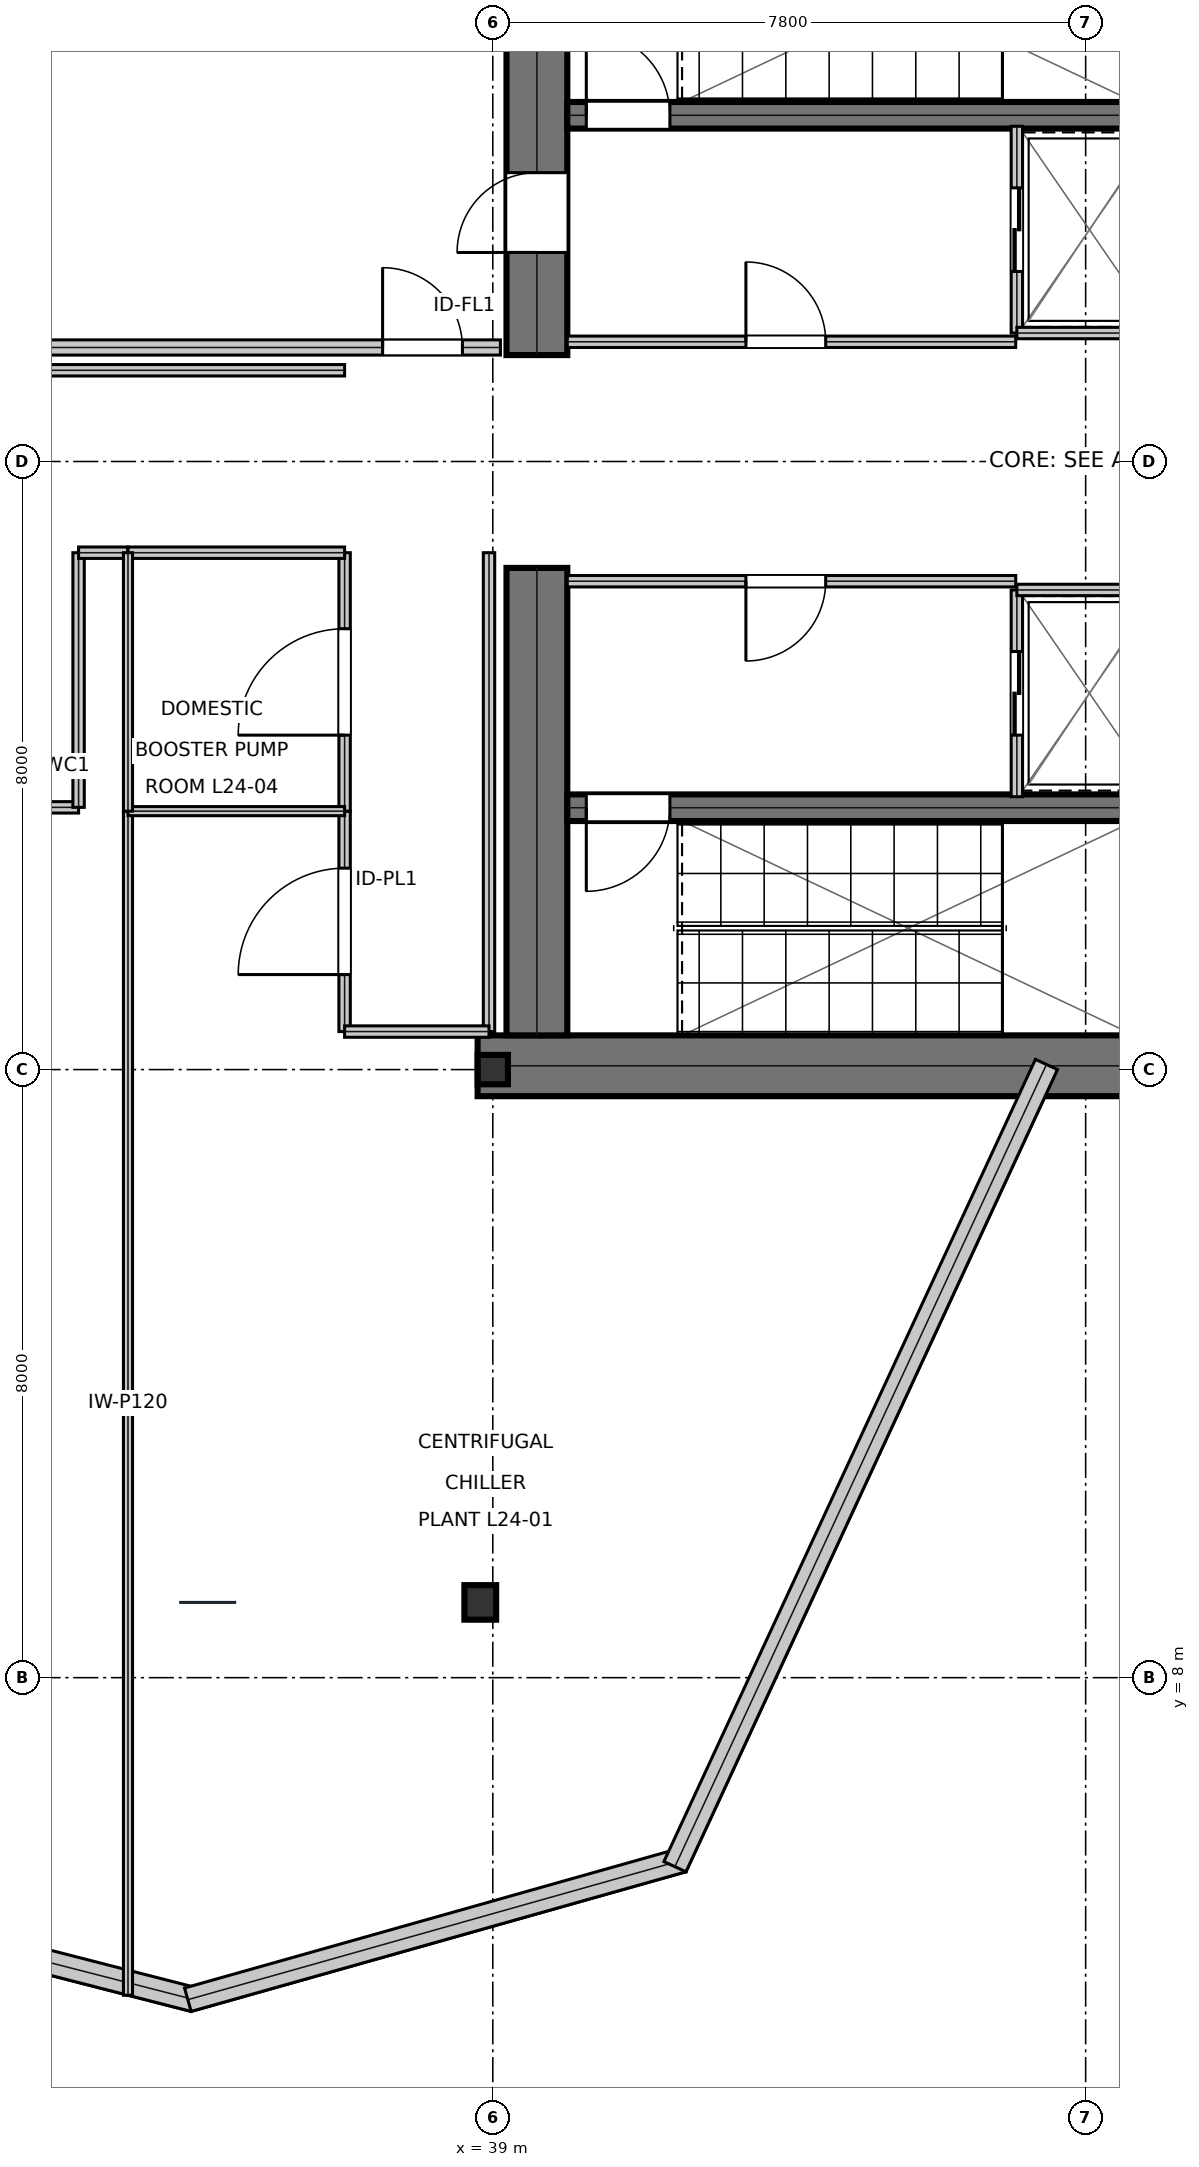
"""IFC4 building model, lengths in metres.
Left out: names, types, materials, properties, quantities, classifications, styles, units other than length and angle.
Written with IfcOpenShell. Run it as: python <this file> out.ifc"""

import sys

from ifc_helpers import new_model, si_unit, direction, frame, frame_2d, origin, origin_2d, place, context, subcontext, project, spatial, rectangle, i_section, extrude, element, fill, save


model = new_model("IFC4")
c1 = context("Model", 3, precision=1e-05, world=origin(), true_north=direction((0.0, 1.0)))
c2 = subcontext(c1, "Body", "Model", "MODEL_VIEW")
j1 = project(units=[si_unit("LENGTHUNIT", "METRE"), si_unit("PLANEANGLEUNIT", "RADIAN")], contexts=[c1])
p1 = place(None, origin())
s1 = spatial("IfcSite", under=j1, at=p1, CompositionType="ELEMENT")
p2 = place(p1, origin())
s2 = spatial("IfcBuilding", under=s1, at=p2, CompositionType="ELEMENT")
p3 = place(p2, frame((0.0, 0.0, 106.65)))
s3 = spatial("IfcBuildingStorey", under=s2, at=p3, CompositionType="ELEMENT", Elevation=106.65)
p4 = place(p3, frame((38.8, 16.05, 0.0), z_axis=(0.0, 0.0, 1.0), x_axis=(1.0, 0.0, 0.0)))
e1 = element("IfcWall", 1, at=p4, inside=s3, PredefinedType="SHEAR", context=c2, shape_type="SweptSolid", body=[
    extrude(rectangle(XDim=16.0, YDim=0.8, at=frame_2d((8.0, 0.0))), origin(), (0.0, 0.0, 1.0), 5.12),
])
p5 = place(p3, frame((39.58, 16.45, 0.0), z_axis=(0.0, 0.0, 1.0), x_axis=(0.0, 1.0, 0.0)))
e2 = element("IfcWall", 2, at=p5, inside=s3, PredefinedType="SHEAR", context=c2, shape_type="SweptSolid", body=[
    extrude(rectangle(XDim=6.15, YDim=0.8, at=frame_2d((3.075, 0.0))), origin(), (0.0, 0.0, 1.0), 5.12),
])
p6 = place(p3, frame((39.58, 25.4, 0.0), z_axis=(0.0, 0.0, 1.0), x_axis=(0.0, 1.0, 0.0)))
e3 = element("IfcWall", 3, at=p6, inside=s3, PredefinedType="SHEAR", context=c2, shape_type="SweptSolid", body=[
    extrude(rectangle(XDim=6.15, YDim=0.8, at=frame_2d((3.075, 0.0))), origin(), (0.0, 0.0, 1.0), 5.12),
])
p7 = place(p6, frame((1.35, 0.0, 0.0)))
e4 = element("IfcOpeningElement", 4, at=p7, cuts=e3, PredefinedType="OPENING", context=c2, shape_type="SweptSolid", body=[
    extrude(rectangle(XDim=1.05, YDim=2.15, at=frame_2d((0.525, 1.075))), frame((0.0, 0.41, 0.0), z_axis=(0.0, -1.0, 0.0), x_axis=(1.0, 0.0, 0.0)), (0.0, 0.0, 1.0), 0.82),
])
p8 = place(p3, frame((39.98, 28.555, 0.0), z_axis=(0.0, 0.0, 1.0), x_axis=(1.0, 0.0, 0.0)))
e5 = element("IfcWall", 5, at=p8, inside=s3, PredefinedType="SHEAR", context=c2, shape_type="SweptSolid", body=[
    extrude(rectangle(XDim=7.71, YDim=0.35, at=frame_2d((3.855, 0.0))), origin(), (0.0, 0.0, 1.0), 5.12),
])
p9 = place(p8, frame((0.25, 0.0, 0.0)))
e6 = element("IfcOpeningElement", 6, at=p9, cuts=e5, PredefinedType="OPENING", context=c2, shape_type="SweptSolid", body=[
    extrude(rectangle(XDim=1.1, YDim=2.15, at=frame_2d((0.55, 1.075))), frame((0.0, 0.185, 0.0), z_axis=(0.0, -1.0, 0.0), x_axis=(1.0, 0.0, 0.0)), (0.0, 0.0, 1.0), 0.37),
])
p10 = place(p3, frame((39.98, 19.445, 0.0), z_axis=(0.0, 0.0, 1.0), x_axis=(1.0, 0.0, 0.0)))
e7 = element("IfcWall", 7, at=p10, inside=s3, PredefinedType="SHEAR", context=c2, shape_type="SweptSolid", body=[
    extrude(rectangle(XDim=7.71, YDim=0.35, at=frame_2d((3.855, 0.0))), origin(), (0.0, 0.0, 1.0), 5.12),
])
p11 = place(p10, frame((0.25, 0.0, 0.0)))
e8 = element("IfcOpeningElement", 8, at=p11, cuts=e7, PredefinedType="OPENING", context=c2, shape_type="SweptSolid", body=[
    extrude(rectangle(XDim=1.1, YDim=2.15, at=frame_2d((0.55, 1.075))), frame((0.0, 0.185, 0.0), z_axis=(0.0, -1.0, 0.0), x_axis=(1.0, 0.0, 0.0)), (0.0, 0.0, 1.0), 0.37),
])
p12 = place(p3, frame((39.0, 16.0, 0.0), z_axis=(0.0, 0.0, 1.0), x_axis=(1.0, 0.0, 0.0)))
e9 = element("IfcColumn", 9, at=p12, inside=s3, PredefinedType="COLUMN", context=c2, shape_type="SweptSolid", body=[
    extrude(i_section(OverallWidth=0.398, OverallDepth=0.387, WebThickness=0.021, FlangeThickness=0.033, at=origin_2d()), origin(), (0.0, 0.0, 1.0), 5.394),
])
p13 = place(p3, frame((38.835, 8.99, 0.016), z_axis=(-0.002773965371, 0.016780216752, 0.99985535426), x_axis=(-0.986609855888, -0.163098106258, 0.0)))
e10 = element("IfcColumn", 10, at=p13, inside=s3, PredefinedType="COLUMN", context=c2, shape_type="SweptSolid", body=[
    extrude(i_section(OverallWidth=0.418, OverallDepth=0.455, WebThickness=0.042, FlangeThickness=0.068, at=origin_2d()), origin(), (0.0, 0.0, 1.0), 5.369),
])
p14 = place(p3, frame((28.561, 5.434, 0.0), z_axis=(0.0, 0.0, 1.0), x_axis=(0.968632710221, -0.248496826319, 0.0)))
e11 = element("IfcWall", 11, at=p14, inside=s3, PredefinedType="STANDARD", context=c2, shape_type="SweptSolid", body=[
    extrude(rectangle(XDim=6.721, YDim=0.32, at=frame_2d((3.361, 0.0))), origin(), (0.0, 0.0, 1.0), 5.12),
])
p15 = place(p3, frame((34.988, 3.763, 0.0), z_axis=(0.0, 0.0, 1.0), x_axis=(0.962413642038, 0.27158788931, 0.0)))
e12 = element("IfcWall", 12, at=p15, inside=s3, PredefinedType="STANDARD", context=c2, shape_type="SweptSolid", body=[
    extrude(rectangle(XDim=6.764, YDim=0.32, at=frame_2d((3.382, 0.0))), origin(), (0.0, 0.0, 1.0), 5.12),
])
p16 = place(p3, frame((41.396, 5.513, 0.0), z_axis=(0.0, 0.0, 1.0), x_axis=(0.420271770487, 0.907398280212, 0.0)))
e13 = element("IfcWall", 13, at=p16, inside=s3, PredefinedType="STANDARD", context=c2, shape_type="SweptSolid", body=[
    extrude(rectangle(XDim=11.631, YDim=0.32, at=frame_2d((5.815, 0.0))), origin(), (0.0, 0.0, 1.0), 4.648),
])
p17 = place(p3, frame((39.98, 25.575, 0.0), z_axis=(0.0, 0.0, 1.0), x_axis=(1.0, 0.0, 0.0)))
e14 = element("IfcWall", 14, at=p17, inside=s3, PredefinedType="PARTITIONING", context=c2, shape_type="SweptSolid", body=[
    extrude(rectangle(XDim=5.9, YDim=0.15, at=frame_2d((2.95, 0.0))), origin(), (0.0, 0.0, 1.0), 5.12),
])
p18 = place(p17, frame((2.35, 0.0, 0.0)))
e15 = element("IfcOpeningElement", 15, at=p18, cuts=e14, PredefinedType="OPENING", context=c2, shape_type="SweptSolid", body=[
    extrude(rectangle(XDim=1.05, YDim=2.15, at=frame_2d((0.525, 1.075))), frame((0.0, 0.085, 0.0), z_axis=(0.0, -1.0, 0.0), x_axis=(1.0, 0.0, 0.0)), (0.0, 0.0, 1.0), 0.17),
])
p19 = place(p3, frame((39.98, 22.425, 0.0), z_axis=(0.0, 0.0, 1.0), x_axis=(1.0, 0.0, 0.0)))
e16 = element("IfcWall", 16, at=p19, inside=s3, PredefinedType="PARTITIONING", context=c2, shape_type="SweptSolid", body=[
    extrude(rectangle(XDim=5.9, YDim=0.15, at=frame_2d((2.95, 0.0))), origin(), (0.0, 0.0, 1.0), 5.12),
])
p20 = place(p19, frame((2.35, 0.0, 0.0)))
e17 = element("IfcOpeningElement", 17, at=p20, cuts=e16, PredefinedType="OPENING", context=c2, shape_type="SweptSolid", body=[
    extrude(rectangle(XDim=1.05, YDim=2.15, at=frame_2d((0.525, 1.075))), frame((0.0, 0.085, 0.0), z_axis=(0.0, -1.0, 0.0), x_axis=(1.0, 0.0, 0.0)), (0.0, 0.0, 1.0), 0.17),
])
p21 = place(p3, frame((45.895, 25.69, 0.0), z_axis=(0.0, 0.0, 1.0), x_axis=(0.0, 1.0, 0.0)))
e18 = element("IfcWall", 18, at=p21, inside=s3, PredefinedType="PARTITIONING", context=c2, shape_type="SweptSolid", body=[
    extrude(rectangle(XDim=2.72, YDim=0.15, at=frame_2d((1.36, 0.0))), origin(), (0.0, 0.0, 1.0), 5.12),
])
p22 = place(p21, frame((0.81, 0.0, 0.0)))
e19 = element("IfcOpeningElement", 19, at=p22, cuts=e18, PredefinedType="OPENING", context=c2, shape_type="SweptSolid", body=[
    extrude(rectangle(XDim=1.1, YDim=2.15, at=frame_2d((0.55, 1.075))), frame((0.0, 0.085, 0.0), z_axis=(0.0, -1.0, 0.0), x_axis=(1.0, 0.0, 0.0)), (0.0, 0.0, 1.0), 0.17),
])
p23 = place(p3, frame((45.895, 25.69, 0.0), z_axis=(0.0, 0.0, 1.0), x_axis=(1.0, 0.0, 0.0)))
e20 = element("IfcWall", 20, at=p23, inside=s3, PredefinedType="PARTITIONING", context=c2, shape_type="SweptSolid", body=[
    extrude(rectangle(XDim=1.915, YDim=0.15, at=frame_2d((0.958, 0.0))), origin(), (0.0, 0.0, 1.0), 5.12),
])
p24 = place(p3, frame((45.895, 19.59, 0.0), z_axis=(0.0, 0.0, 1.0), x_axis=(0.0, 1.0, 0.0)))
e21 = element("IfcWall", 21, at=p24, inside=s3, PredefinedType="PARTITIONING", context=c2, shape_type="SweptSolid", body=[
    extrude(rectangle(XDim=2.72, YDim=0.15, at=frame_2d((1.36, 0.0))), origin(), (0.0, 0.0, 1.0), 5.12),
])
p25 = place(p24, frame((0.81, 0.0, 0.0)))
e22 = element("IfcOpeningElement", 22, at=p25, cuts=e21, PredefinedType="OPENING", context=c2, shape_type="SweptSolid", body=[
    extrude(rectangle(XDim=1.1, YDim=2.15, at=frame_2d((0.55, 1.075))), frame((0.0, 0.085, 0.0), z_axis=(0.0, -1.0, 0.0), x_axis=(1.0, 0.0, 0.0)), (0.0, 0.0, 1.0), 0.17),
])
p26 = place(p3, frame((45.895, 22.31, 0.0), z_axis=(0.0, 0.0, 1.0), x_axis=(1.0, 0.0, 0.0)))
e23 = element("IfcWall", 23, at=p26, inside=s3, PredefinedType="PARTITIONING", context=c2, shape_type="SweptSolid", body=[
    extrude(rectangle(XDim=1.915, YDim=0.15, at=frame_2d((0.958, 0.0))), origin(), (0.0, 0.0, 1.0), 5.12),
])
p27 = place(p3, frame((22.15, 25.5, 0.0), z_axis=(0.0, 0.0, 1.0), x_axis=(1.0, 0.0, 0.0)))
e24 = element("IfcWall", 24, at=p27, inside=s3, PredefinedType="SOLIDWALL", context=c2, shape_type="SweptSolid", body=[
    extrude(rectangle(XDim=16.95, YDim=0.2, at=frame_2d((8.475, 0.0))), origin(), (0.0, 0.0, 1.0), 4.5),
])
p28 = place(p27, frame((15.4, 0.0, 0.0)))
e25 = element("IfcOpeningElement", 25, at=p28, cuts=e24, PredefinedType="OPENING", context=c2, shape_type="SweptSolid", body=[
    extrude(rectangle(XDim=1.05, YDim=2.15, at=frame_2d((0.525, 1.075))), frame((0.0, 0.11, 0.0), z_axis=(0.0, -1.0, 0.0), x_axis=(1.0, 0.0, 0.0)), (0.0, 0.0, 1.0), 0.22),
])
p29 = place(p3, frame((37.05, 16.5, 0.0), z_axis=(0.0, 0.0, 1.0), x_axis=(0.0, 1.0, 0.0)))
e26 = element("IfcWall", 26, at=p29, inside=s3, PredefinedType="PARTITIONING", context=c2, shape_type="SweptSolid", body=[
    extrude(rectangle(XDim=2.9, YDim=0.15, at=frame_2d((1.45, 0.0))), origin(), (0.0, 0.0, 1.0), 4.753),
])
p30 = place(p29, frame((0.75, 0.0, 0.0)))
e27 = element("IfcOpeningElement", 27, at=p30, cuts=e26, PredefinedType="OPENING", context=c2, shape_type="SweptSolid", body=[
    extrude(rectangle(XDim=1.4, YDim=2.2, at=frame_2d((0.7, 1.1))), frame((0.0, 0.085, 0.0), z_axis=(0.0, -1.0, 0.0), x_axis=(1.0, 0.0, 0.0)), (0.0, 0.0, 1.0), 0.17),
])
p31 = place(p3, frame((31.8, 19.45, 0.0), z_axis=(0.0, 0.0, 1.0), x_axis=(1.0, 0.0, 0.0)))
e28 = element("IfcWall", 28, at=p31, inside=s3, PredefinedType="PARTITIONING", context=c2, shape_type="SweptSolid", body=[
    extrude(rectangle(XDim=1.75, YDim=0.15, at=frame_2d((0.875, 0.0))), origin(), (0.0, 0.0, 1.0), 5.12),
])
p32 = place(p31, frame((0.45, 0.0, 0.0)))
e29 = element("IfcOpeningElement", 29, at=p32, cuts=e28, PredefinedType="OPENING", context=c2, shape_type="SweptSolid", body=[
    extrude(rectangle(XDim=0.85, YDim=2.15, at=frame_2d((0.425, 1.075))), frame((0.0, 0.085, 0.0), z_axis=(0.0, -1.0, 0.0), x_axis=(1.0, 0.0, 0.0)), (0.0, 0.0, 1.0), 0.17),
])
p33 = place(p3, frame((37.05, 19.4, 0.0), z_axis=(0.0, 0.0, 1.0), x_axis=(0.0, 1.0, 0.0)))
e30 = element("IfcWall", 30, at=p33, inside=s3, PredefinedType="PARTITIONING", context=c2, shape_type="SweptSolid", body=[
    extrude(rectangle(XDim=3.4, YDim=0.15, at=frame_2d((1.7, 0.0))), origin(), (0.0, 0.0, 1.0), 4.753),
])
p34 = place(p33, frame((1.0, 0.0, 0.0)))
e31 = element("IfcOpeningElement", 31, at=p34, cuts=e30, PredefinedType="OPENING", context=c2, shape_type="SweptSolid", body=[
    extrude(rectangle(XDim=1.4, YDim=2.2, at=frame_2d((0.7, 1.1))), frame((0.0, 0.085, 0.0), z_axis=(0.0, -1.0, 0.0), x_axis=(1.0, 0.0, 0.0)), (0.0, 0.0, 1.0), 0.17),
])
p35 = place(p3, frame((16.5, 25.2, 0.0), z_axis=(0.0, 0.0, 1.0), x_axis=(1.0, 0.0, 0.0)))
e32 = element("IfcWall", 32, at=p35, inside=s3, PredefinedType="PARTITIONING", context=c2, shape_type="SweptSolid", body=[
    extrude(rectangle(XDim=20.55, YDim=0.15, at=frame_2d((10.275, 0.0))), origin(), (0.0, 0.0, 1.0), 4.5),
])
p36 = place(p35, frame((3.095, 0.0, 0.0)))
e33 = element("IfcOpeningElement", 33, at=p36, cuts=e32, PredefinedType="OPENING", context=c2, shape_type="SweptSolid", body=[
    extrude(rectangle(XDim=1.4, YDim=2.2, at=frame_2d((0.7, 1.1))), frame((0.0, 0.085, 0.0), z_axis=(0.0, -1.0, 0.0), x_axis=(1.0, 0.0, 0.0)), (0.0, 0.0, 1.0), 0.17),
])
p37 = place(p3, frame((38.95, 16.5, 0.0), z_axis=(0.0, 0.0, 1.0), x_axis=(0.0, 1.0, 0.0)))
e34 = element("IfcWall", 34, at=p37, inside=s3, PredefinedType="PARTITIONING", context=c2, shape_type="SweptSolid", body=[
    extrude(rectangle(XDim=6.3, YDim=0.15, at=frame_2d((3.15, 0.0))), origin(), (0.0, 0.0, 1.0), 4.753),
])
p38 = place(p3, frame((37.05, 16.5, 0.0), z_axis=(0.0, 0.0, 1.0), x_axis=(1.0, 0.0, 0.0)))
e35 = element("IfcWall", 35, at=p38, inside=s3, PredefinedType="PARTITIONING", context=c2, shape_type="SweptSolid", body=[
    extrude(rectangle(XDim=1.9, YDim=0.15, at=frame_2d((0.95, 0.0))), origin(), (0.0, 0.0, 1.0), 5.12),
])
p39 = place(p3, frame((33.55, 19.45, 0.0), z_axis=(0.0, 0.0, 1.0), x_axis=(0.0, 1.0, 0.0)))
e36 = element("IfcWall", 36, at=p39, inside=s3, PredefinedType="PARTITIONING", context=c2, shape_type="SweptSolid", body=[
    extrude(rectangle(XDim=3.35, YDim=0.15, at=frame_2d((1.675, 0.0))), origin(), (0.0, 0.0, 1.0), 4.753),
])
p40 = place(p3, frame((33.55, 22.8, 0.0), z_axis=(0.0, 0.0, 1.0), x_axis=(1.0, 0.0, 0.0)))
e37 = element("IfcWall", 37, at=p40, inside=s3, PredefinedType="PARTITIONING", context=c2, shape_type="SweptSolid", body=[
    extrude(rectangle(XDim=0.65, YDim=0.15, at=frame_2d((0.325, 0.0))), origin(), (0.0, 0.0, 1.0), 5.12),
])
p41 = place(p3, frame((34.2, 22.8, 0.0), z_axis=(0.0, 0.0, 1.0), x_axis=(1.0, 0.0, 0.0)))
e38 = element("IfcWall", 38, at=p41, inside=s3, PredefinedType="PARTITIONING", context=c2, shape_type="SweptSolid", body=[
    extrude(rectangle(XDim=2.85, YDim=0.15, at=frame_2d((1.425, 0.0))), origin(), (0.0, 0.0, 1.0), 5.12),
])
p42 = place(p3, frame((34.2, 3.822, 0.0), z_axis=(0.0, 0.0, 1.0), x_axis=(0.0, 1.0, 0.0)))
e39 = element("IfcWall", 39, at=p42, inside=s3, PredefinedType="PARTITIONING", context=c2, shape_type="SweptSolid", body=[
    extrude(rectangle(XDim=15.578, YDim=0.12, at=frame_2d((7.789, 0.0))), origin(), (0.0, 0.0, 1.0), 4.5),
])
p43 = place(p3, frame((34.2, 19.4, 0.0), z_axis=(0.0, 0.0, 1.0), x_axis=(1.0, 0.0, 0.0)))
e40 = element("IfcWall", 40, at=p43, inside=s3, PredefinedType="PARTITIONING", context=c2, shape_type="SweptSolid", body=[
    extrude(rectangle(XDim=2.85, YDim=0.12, at=frame_2d((1.425, 0.0))), origin(), (0.0, 0.0, 1.0), 5.12),
])
p44 = place(p3, frame((34.2, 19.4, 0.0), z_axis=(0.0, 0.0, 1.0), x_axis=(0.0, 1.0, 0.0)))
e41 = element("IfcWall", 41, at=p44, inside=s3, PredefinedType="PARTITIONING", context=c2, shape_type="SweptSolid", body=[
    extrude(rectangle(XDim=3.4, YDim=0.12, at=frame_2d((1.7, 0.0))), origin(), (0.0, 0.0, 1.0), 4.753),
])
p45 = place(p18, origin())
e42 = element("IfcDoor", 42, at=p45, inside=s3, OperationType="SINGLE_SWING_LEFT", PredefinedType="DOOR", context=c2, shape_type="SweptSolid", body=[
    extrude(rectangle(XDim=1.05, YDim=2.15, at=frame_2d((0.525, 1.075))), frame((0.0, 0.025, 0.0), z_axis=(0.0, -1.0, 0.0), x_axis=(1.0, 0.0, 0.0)), (0.0, 0.0, 1.0), 0.05),
])
fill(e15, e42)
p46 = place(p20, frame((1.05, 0.0, 0.0), z_axis=(0.0, 0.0, 1.0), x_axis=(-1.0, 0.0, 0.0)))
e43 = element("IfcDoor", 43, at=p46, inside=s3, OperationType="SINGLE_SWING_RIGHT", PredefinedType="DOOR", context=c2, shape_type="SweptSolid", body=[
    extrude(rectangle(XDim=1.05, YDim=2.15, at=frame_2d((0.525, 1.075))), frame((0.0, 0.025, 0.0), z_axis=(0.0, -1.0, 0.0), x_axis=(1.0, 0.0, 0.0)), (0.0, 0.0, 1.0), 0.05),
])
fill(e17, e43)
p47 = place(p22, frame((1.1, 0.0, 0.0), z_axis=(0.0, 0.0, 1.0), x_axis=(-1.0, 0.0, 0.0)))
e44 = element("IfcDoor", 44, at=p47, inside=s3, OperationType="DOUBLE_DOOR_SLIDING", PredefinedType="DOOR", context=c2, shape_type="SweptSolid", body=[
    extrude(rectangle(XDim=1.1, YDim=2.15, at=frame_2d((0.55, 1.075))), frame((0.0, 0.025, 0.0), z_axis=(0.0, -1.0, 0.0), x_axis=(1.0, 0.0, 0.0)), (0.0, 0.0, 1.0), 0.05),
])
fill(e19, e44)
p48 = place(p25, frame((1.1, 0.0, 0.0), z_axis=(0.0, 0.0, 1.0), x_axis=(-1.0, 0.0, 0.0)))
e45 = element("IfcDoor", 45, at=p48, inside=s3, OperationType="DOUBLE_DOOR_SLIDING", PredefinedType="DOOR", context=c2, shape_type="SweptSolid", body=[
    extrude(rectangle(XDim=1.1, YDim=2.15, at=frame_2d((0.55, 1.075))), frame((0.0, 0.025, 0.0), z_axis=(0.0, -1.0, 0.0), x_axis=(1.0, 0.0, 0.0)), (0.0, 0.0, 1.0), 0.05),
])
fill(e22, e45)
p49 = place(p28, origin())
e46 = element("IfcDoor", 46, at=p49, inside=s3, OperationType="SINGLE_SWING_LEFT", PredefinedType="DOOR", context=c2, shape_type="SweptSolid", body=[
    extrude(rectangle(XDim=1.05, YDim=2.15, at=frame_2d((0.525, 1.075))), frame((0.0, 0.025, 0.0), z_axis=(0.0, -1.0, 0.0), x_axis=(1.0, 0.0, 0.0)), (0.0, 0.0, 1.0), 0.05),
])
fill(e25, e46)
p50 = place(p30, origin())
e47 = element("IfcDoor", 47, at=p50, inside=s3, OperationType="SINGLE_SWING_LEFT", PredefinedType="DOOR", context=c2, shape_type="SweptSolid", body=[
    extrude(rectangle(XDim=1.4, YDim=2.2, at=frame_2d((0.7, 1.1))), frame((0.0, 0.025, 0.0), z_axis=(0.0, -1.0, 0.0), x_axis=(1.0, 0.0, 0.0)), (0.0, 0.0, 1.0), 0.05),
])
fill(e27, e47)
p51 = place(p34, origin())
e48 = element("IfcDoor", 48, at=p51, inside=s3, OperationType="SINGLE_SWING_LEFT", PredefinedType="DOOR", context=c2, shape_type="SweptSolid", body=[
    extrude(rectangle(XDim=1.4, YDim=2.2, at=frame_2d((0.7, 1.1))), frame((0.0, 0.025, 0.0), z_axis=(0.0, -1.0, 0.0), x_axis=(1.0, 0.0, 0.0)), (0.0, 0.0, 1.0), 0.05),
])
fill(e31, e48)
p52 = place(p9, origin())
e49 = element("IfcDoor", 49, at=p52, inside=s3, OperationType="SINGLE_SWING_LEFT", PredefinedType="DOOR", context=c2, shape_type="SweptSolid", body=[
    extrude(rectangle(XDim=1.1, YDim=2.15, at=frame_2d((0.55, 1.075))), frame((0.0, 0.025, 0.0), z_axis=(0.0, -1.0, 0.0), x_axis=(1.0, 0.0, 0.0)), (0.0, 0.0, 1.0), 0.05),
])
fill(e6, e49)
p53 = place(p11, frame((1.1, 0.0, 0.0), z_axis=(0.0, 0.0, 1.0), x_axis=(-1.0, 0.0, 0.0)))
e50 = element("IfcDoor", 50, at=p53, inside=s3, OperationType="SINGLE_SWING_RIGHT", PredefinedType="DOOR", context=c2, shape_type="SweptSolid", body=[
    extrude(rectangle(XDim=1.1, YDim=2.15, at=frame_2d((0.55, 1.075))), frame((0.0, 0.025, 0.0), z_axis=(0.0, -1.0, 0.0), x_axis=(1.0, 0.0, 0.0)), (0.0, 0.0, 1.0), 0.05),
])
fill(e8, e50)
p54 = place(p7, origin())
e51 = element("IfcDoor", 51, at=p54, inside=s3, OperationType="SINGLE_SWING_LEFT", PredefinedType="DOOR", context=c2, shape_type="SweptSolid", body=[
    extrude(rectangle(XDim=1.05, YDim=2.15, at=frame_2d((0.525, 1.075))), frame((0.0, 0.025, 0.0), z_axis=(0.0, -1.0, 0.0), x_axis=(1.0, 0.0, 0.0)), (0.0, 0.0, 1.0), 0.05),
])
fill(e4, e51)
save(model, sys.argv[1])
